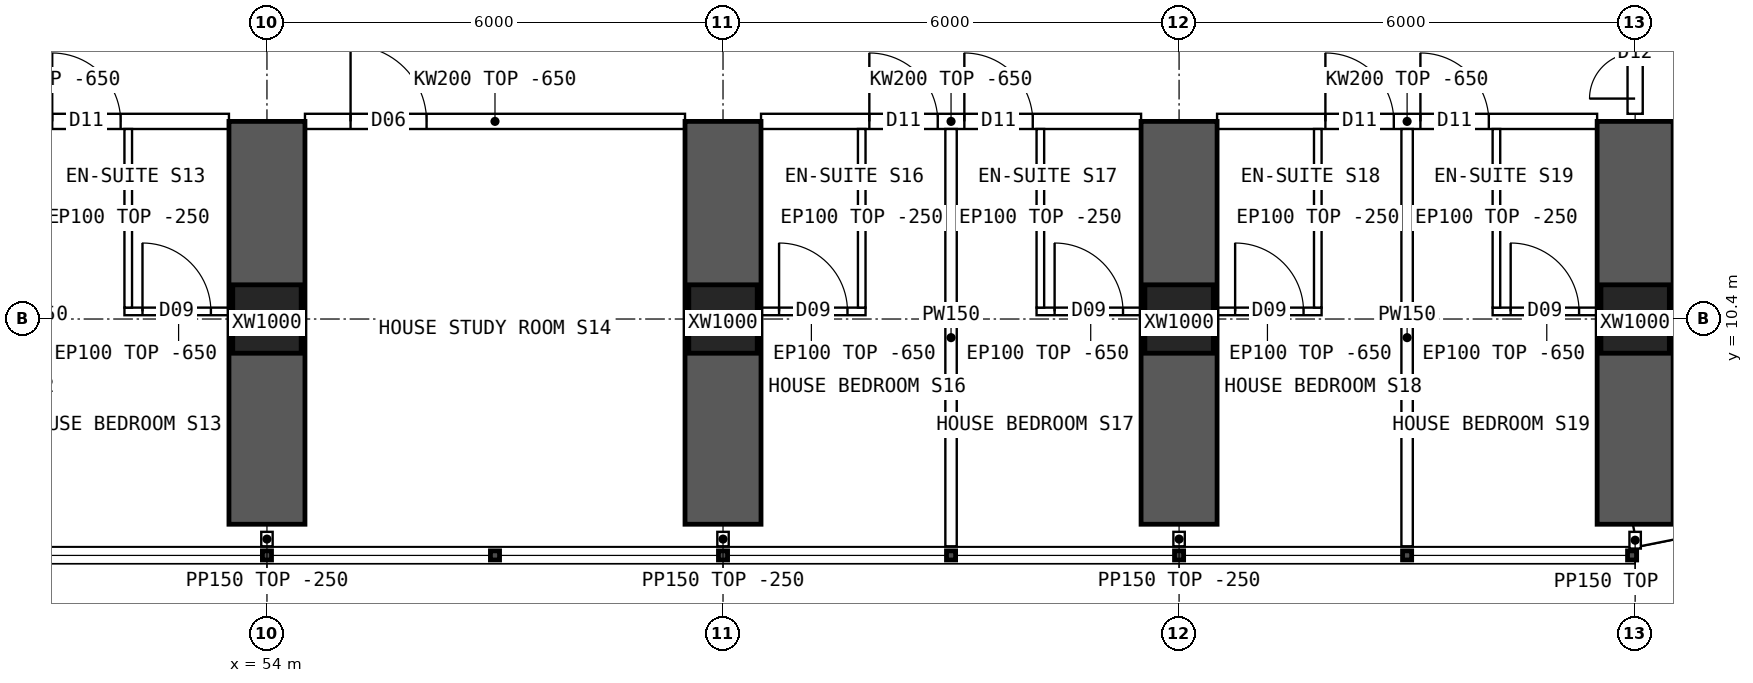
"""IFC4 building model, lengths in metres.
Left out: names, types, materials, properties, quantities, classifications, styles, units other than length and angle.
Written with IfcOpenShell. Run it as: python <this file> out.ifc"""

import sys

from ifc_helpers import new_model, si_unit, direction, frame, frame_2d, origin, origin_2d, place, context, subcontext, project, spatial, polyline, rectangle, hollow_rectangle, outline, extrude, element, fill, save


model = new_model("IFC4")
c1 = context("Model", 3, precision=1e-05, world=origin(), true_north=direction((0.0, 1.0)))
c2 = subcontext(c1, "Body", "Model", "MODEL_VIEW")
j1 = project(units=[si_unit("LENGTHUNIT", "METRE"), si_unit("PLANEANGLEUNIT", "RADIAN")], contexts=[c1])
p1 = place(None, origin())
s1 = spatial("IfcSite", under=j1, at=p1, CompositionType="ELEMENT")
p2 = place(p1, origin())
s2 = spatial("IfcBuilding", under=s1, at=p2, CompositionType="ELEMENT")
p3 = place(p2, frame((0.0, 0.0, 23.95)))
s3 = spatial("IfcBuildingStorey", under=s2, at=p3, CompositionType="ELEMENT", Elevation=23.95)
for number, where, z_axis, x_axis in (
    (1, (54.0, 10.4, 0.0), (0.0, 0.0, 1.0), (1.0, 0.0, 0.0)),
    (2, (60.0, 10.4, 0.0), (0.0, 0.0, 1.0), (1.0, 0.0, 0.0)),
    (3, (66.0, 10.4, 0.0), (0.0, 0.0, 1.0), (1.0, 0.0, 0.0)),
    (4, (72.0, 10.4, 0.0), (0.0, 0.0, 1.0), (1.0, 0.0, 0.0)),
):
    element("IfcColumn", number, at=place(p3, frame(where, z_axis=z_axis, x_axis=x_axis)), inside=s3, PredefinedType="COLUMN", context=c2, shape_type="SweptSolid", body=[
        extrude(hollow_rectangle(XDim=0.9, YDim=0.9, WallThickness=0.09, at=origin_2d()), origin(), (0.0, 0.0, 1.0), 3.75),
    ])
for number, where, z_axis, x_axis in (
    (5, (54.0, 7.7, 0.0), (0.0, 0.0, 1.0), (0.0, 1.0, 0.0)),
    (6, (60.0, 7.7, 0.0), (0.0, 0.0, 1.0), (0.0, 1.0, 0.0)),
    (7, (66.0, 7.7, 0.0), (0.0, 0.0, 1.0), (0.0, 1.0, 0.0)),
    (8, (72.0, 7.7, 0.0), (0.0, 0.0, 1.0), (0.0, 1.0, 0.0)),
):
    element("IfcWall", number, at=place(p3, frame(where, z_axis=z_axis, x_axis=x_axis)), inside=s3, PredefinedType="SHEAR", context=c2, shape_type="SweptSolid", body=[
        extrude(rectangle(XDim=5.3, YDim=1.0, at=frame_2d((2.65, 0.0))), origin(), (0.0, 0.0, 1.0), 3.75),
    ])
p4 = place(p3, frame((72.0, 7.55, 0.0), z_axis=(0.0, 0.0, 1.0), x_axis=(0.980787251524, 0.195080412259, 0.0)))
e9 = element("IfcWall", 9, at=p4, inside=s3, PredefinedType="SOLIDWALL", context=c2, shape_type="SweptSolid", body=[
    extrude(outline(polyline([(-0.03, -0.15), (3.249, -0.15), (3.189, 0.15), (0.03, 0.15), (-0.03, -0.15)])), origin(), (0.0, 0.0, 1.0), 3.5),
])
p5 = place(p4, frame((0.909, 0.0, 0.9)))
e10 = element("IfcOpeningElement", 10, at=p5, cuts=e9, PredefinedType="OPENING", context=c2, shape_type="SweptSolid", body=[
    extrude(rectangle(XDim=1.4, YDim=1.8, at=frame_2d((0.7, 0.9))), frame((0.0, 0.16, 0.0), z_axis=(0.0, -1.0, 0.0), x_axis=(1.0, 0.0, 0.0)), (0.0, 0.0, 1.0), 0.32),
])
p6 = place(p3, frame((48.5, 13.0, 0.0), z_axis=(0.0, 0.0, 1.0), x_axis=(1.0, 0.0, 0.0)))
e11 = element("IfcWall", 11, at=p6, inside=s3, PredefinedType="SOLIDWALL", context=c2, shape_type="SweptSolid", body=[
    extrude(outline(polyline([(0.0, 0.0), (5.0, 0.0), (5.0, 3.1), (0.0, 3.1), (0.0, 0.0)])), frame((0.0, 0.1, 0.0), z_axis=(0.0, -1.0, 0.0), x_axis=(1.0, 0.0, 0.0)), (0.0, 0.0, 1.0), 0.2),
])
p7 = place(p6, frame((1.425, 0.0, 0.0)))
e12 = element("IfcOpeningElement", 12, at=p7, cuts=e11, PredefinedType="OPENING", context=c2, shape_type="SweptSolid", body=[
    extrude(rectangle(XDim=0.9, YDim=2.1, at=frame_2d((0.45, 1.05))), frame((0.0, 0.11, 0.0), z_axis=(0.0, -1.0, 0.0), x_axis=(1.0, 0.0, 0.0)), (0.0, 0.0, 1.0), 0.22),
])
p8 = place(p6, frame((2.675, 0.0, 0.0)))
e13 = element("IfcOpeningElement", 13, at=p8, cuts=e11, PredefinedType="OPENING", context=c2, shape_type="SweptSolid", body=[
    extrude(rectangle(XDim=0.9, YDim=2.1, at=frame_2d((0.45, 1.05))), frame((0.0, 0.11, 0.0), z_axis=(0.0, -1.0, 0.0), x_axis=(1.0, 0.0, 0.0)), (0.0, 0.0, 1.0), 0.22),
])
p9 = place(p3, frame((54.5, 13.0, 0.0), z_axis=(0.0, 0.0, 1.0), x_axis=(1.0, 0.0, 0.0)))
e14 = element("IfcWall", 14, at=p9, inside=s3, PredefinedType="SOLIDWALL", context=c2, shape_type="SweptSolid", body=[
    extrude(outline(polyline([(0.0, 0.0), (5.0, 0.0), (5.0, 3.1), (0.0, 3.1), (0.0, 0.0)])), frame((0.0, 0.1, 0.0), z_axis=(0.0, -1.0, 0.0), x_axis=(1.0, 0.0, 0.0)), (0.0, 0.0, 1.0), 0.2),
])
p10 = place(p9, frame((0.6, 0.0, 0.0)))
e15 = element("IfcOpeningElement", 15, at=p10, cuts=e14, PredefinedType="OPENING", context=c2, shape_type="SweptSolid", body=[
    extrude(rectangle(XDim=1.0, YDim=2.1, at=frame_2d((0.5, 1.05))), frame((0.0, 0.11, 0.0), z_axis=(0.0, -1.0, 0.0), x_axis=(1.0, 0.0, 0.0)), (0.0, 0.0, 1.0), 0.22),
])
p11 = place(p3, frame((60.5, 13.0, 0.0), z_axis=(0.0, 0.0, 1.0), x_axis=(1.0, 0.0, 0.0)))
e16 = element("IfcWall", 16, at=p11, inside=s3, PredefinedType="SOLIDWALL", context=c2, shape_type="SweptSolid", body=[
    extrude(outline(polyline([(0.0, 0.0), (5.0, 0.0), (5.0, 3.1), (0.0, 3.1), (0.0, 0.0)])), frame((0.0, 0.1, 0.0), z_axis=(0.0, -1.0, 0.0), x_axis=(1.0, 0.0, 0.0)), (0.0, 0.0, 1.0), 0.2),
])
p12 = place(p11, frame((1.425, 0.0, 0.0)))
e17 = element("IfcOpeningElement", 17, at=p12, cuts=e16, PredefinedType="OPENING", context=c2, shape_type="SweptSolid", body=[
    extrude(rectangle(XDim=0.9, YDim=2.1, at=frame_2d((0.45, 1.05))), frame((0.0, 0.11, 0.0), z_axis=(0.0, -1.0, 0.0), x_axis=(1.0, 0.0, 0.0)), (0.0, 0.0, 1.0), 0.22),
])
p13 = place(p11, frame((2.675, 0.0, 0.0)))
e18 = element("IfcOpeningElement", 18, at=p13, cuts=e16, PredefinedType="OPENING", context=c2, shape_type="SweptSolid", body=[
    extrude(rectangle(XDim=0.9, YDim=2.1, at=frame_2d((0.45, 1.05))), frame((0.0, 0.11, 0.0), z_axis=(0.0, -1.0, 0.0), x_axis=(1.0, 0.0, 0.0)), (0.0, 0.0, 1.0), 0.22),
])
p14 = place(p3, frame((66.5, 13.0, 0.0), z_axis=(0.0, 0.0, 1.0), x_axis=(1.0, 0.0, 0.0)))
e19 = element("IfcWall", 19, at=p14, inside=s3, PredefinedType="SOLIDWALL", context=c2, shape_type="SweptSolid", body=[
    extrude(outline(polyline([(0.0, 0.0), (5.0, 0.0), (5.0, 3.1), (0.0, 3.1), (0.0, 0.0)])), frame((0.0, 0.1, 0.0), z_axis=(0.0, -1.0, 0.0), x_axis=(1.0, 0.0, 0.0)), (0.0, 0.0, 1.0), 0.2),
])
p15 = place(p14, frame((1.425, 0.0, 0.0)))
e20 = element("IfcOpeningElement", 20, at=p15, cuts=e19, PredefinedType="OPENING", context=c2, shape_type="SweptSolid", body=[
    extrude(rectangle(XDim=0.9, YDim=2.1, at=frame_2d((0.45, 1.05))), frame((0.0, 0.11, 0.0), z_axis=(0.0, -1.0, 0.0), x_axis=(1.0, 0.0, 0.0)), (0.0, 0.0, 1.0), 0.22),
])
p16 = place(p14, frame((2.675, 0.0, 0.0)))
e21 = element("IfcOpeningElement", 21, at=p16, cuts=e19, PredefinedType="OPENING", context=c2, shape_type="SweptSolid", body=[
    extrude(rectangle(XDim=0.9, YDim=2.1, at=frame_2d((0.45, 1.05))), frame((0.0, 0.11, 0.0), z_axis=(0.0, -1.0, 0.0), x_axis=(1.0, 0.0, 0.0)), (0.0, 0.0, 1.0), 0.22),
])
p17 = place(p3, frame((53.55, 10.5, 0.0), z_axis=(0.0, 0.0, 1.0), x_axis=(-1.0, 0.0, 0.0)))
e22 = element("IfcWall", 22, at=p17, inside=s3, PredefinedType="PARTITIONING", context=c2, shape_type="SweptSolid", body=[
    extrude(outline(polyline([(0.0, 0.0), (1.425, 0.0), (1.425, 3.1), (0.0, 3.1), (0.0, 0.0)])), frame((0.0, 0.05, 0.0), z_axis=(0.0, -1.0, 0.0), x_axis=(1.0, 0.0, 0.0)), (0.0, 0.0, 1.0), 0.1),
])
p18 = place(p17, frame((0.288, 0.0, 0.0)))
e23 = element("IfcOpeningElement", 23, at=p18, cuts=e22, PredefinedType="OPENING", context=c2, shape_type="SweptSolid", body=[
    extrude(rectangle(XDim=0.9, YDim=2.1, at=frame_2d((0.45, 1.05))), frame((0.0, 0.06, 0.0), z_axis=(0.0, -1.0, 0.0), x_axis=(1.0, 0.0, 0.0)), (0.0, 0.0, 1.0), 0.12),
])
p19 = place(p3, frame((52.175, 10.55, 0.0), z_axis=(0.0, 0.0, 1.0), x_axis=(0.0, 1.0, 0.0)))
e24 = element("IfcWall", 24, at=p19, inside=s3, PredefinedType="PARTITIONING", context=c2, shape_type="SweptSolid", body=[
    extrude(outline(polyline([(0.0, 0.0), (2.35, 0.0), (2.35, 3.1), (2.302, 3.1), (2.3, 3.5), (0.052, 3.5), (0.05, 3.1), (0.0, 3.1), (0.0, 0.0)])), frame((0.0, 0.05, 0.0), z_axis=(0.0, -1.0, 0.0), x_axis=(1.0, 0.0, 0.0)), (0.0, 0.0, 1.0), 0.1),
])
p20 = place(p3, frame((63.0, 7.41, 0.0), z_axis=(0.0, 0.0, 1.0), x_axis=(0.0, 1.0, 0.0)))
e25 = element("IfcWall", 25, at=p20, inside=s3, PredefinedType="PARTITIONING", context=c2, shape_type="SweptSolid", body=[
    extrude(outline(polyline([(0.0, 0.0), (5.49, 0.0), (5.49, 3.1), (5.442, 3.1), (5.44, 3.5), (3.192, 3.5), (3.19, 3.1), (2.792, 3.1), (2.79, 3.5), (0.0, 3.5), (0.0, 0.0)])), frame((0.0, 0.075, 0.0), z_axis=(0.0, -1.0, 0.0), x_axis=(1.0, 0.0, 0.0)), (0.0, 0.0, 1.0), 0.15),
])
p21 = place(p3, frame((61.875, 10.5, 0.0), z_axis=(0.0, 0.0, 1.0), x_axis=(-1.0, 0.0, 0.0)))
e26 = element("IfcWall", 26, at=p21, inside=s3, PredefinedType="PARTITIONING", context=c2, shape_type="SweptSolid", body=[
    extrude(outline(polyline([(0.0, 0.0), (1.425, 0.0), (1.425, 3.1), (0.0, 3.1), (0.0, 0.0)])), frame((0.0, 0.05, 0.0), z_axis=(0.0, -1.0, 0.0), x_axis=(1.0, 0.0, 0.0)), (0.0, 0.0, 1.0), 0.1),
])
p22 = place(p21, frame((0.238, 0.0, 0.0)))
e27 = element("IfcOpeningElement", 27, at=p22, cuts=e26, PredefinedType="OPENING", context=c2, shape_type="SweptSolid", body=[
    extrude(rectangle(XDim=0.9, YDim=2.1, at=frame_2d((0.45, 1.05))), frame((0.0, 0.06, 0.0), z_axis=(0.0, -1.0, 0.0), x_axis=(1.0, 0.0, 0.0)), (0.0, 0.0, 1.0), 0.12),
])
p23 = place(p3, frame((61.825, 10.55, 0.0), z_axis=(0.0, 0.0, 1.0), x_axis=(0.0, 1.0, 0.0)))
e28 = element("IfcWall", 28, at=p23, inside=s3, PredefinedType="PARTITIONING", context=c2, shape_type="SweptSolid", body=[
    extrude(outline(polyline([(0.0, 0.0), (2.35, 0.0), (2.35, 3.1), (2.302, 3.1), (2.3, 3.5), (0.052, 3.5), (0.05, 3.1), (0.0, 3.1), (0.0, 0.0)])), frame((0.0, 0.05, 0.0), z_axis=(0.0, -1.0, 0.0), x_axis=(1.0, 0.0, 0.0)), (0.0, 0.0, 1.0), 0.1),
])
p24 = place(p3, frame((65.55, 10.5, 0.0), z_axis=(0.0, 0.0, 1.0), x_axis=(-1.0, 0.0, 0.0)))
e29 = element("IfcWall", 29, at=p24, inside=s3, PredefinedType="PARTITIONING", context=c2, shape_type="SweptSolid", body=[
    extrude(outline(polyline([(0.0, 0.0), (1.425, 0.0), (1.425, 3.1), (0.0, 3.1), (0.0, 0.0)])), frame((0.0, 0.05, 0.0), z_axis=(0.0, -1.0, 0.0), x_axis=(1.0, 0.0, 0.0)), (0.0, 0.0, 1.0), 0.1),
])
p25 = place(p24, frame((0.288, 0.0, 0.0)))
e30 = element("IfcOpeningElement", 30, at=p25, cuts=e29, PredefinedType="OPENING", context=c2, shape_type="SweptSolid", body=[
    extrude(rectangle(XDim=0.9, YDim=2.1, at=frame_2d((0.45, 1.05))), frame((0.0, 0.06, 0.0), z_axis=(0.0, -1.0, 0.0), x_axis=(1.0, 0.0, 0.0)), (0.0, 0.0, 1.0), 0.12),
])
p26 = place(p3, frame((64.175, 10.55, 0.0), z_axis=(0.0, 0.0, 1.0), x_axis=(0.0, 1.0, 0.0)))
e31 = element("IfcWall", 31, at=p26, inside=s3, PredefinedType="PARTITIONING", context=c2, shape_type="SweptSolid", body=[
    extrude(outline(polyline([(0.0, 0.0), (2.35, 0.0), (2.35, 3.1), (2.302, 3.1), (2.3, 3.5), (0.052, 3.5), (0.05, 3.1), (0.0, 3.1), (0.0, 0.0)])), frame((0.0, 0.05, 0.0), z_axis=(0.0, -1.0, 0.0), x_axis=(1.0, 0.0, 0.0)), (0.0, 0.0, 1.0), 0.1),
])
p27 = place(p3, frame((69.0, 7.41, 0.0), z_axis=(0.0, 0.0, 1.0), x_axis=(0.0, 1.0, 0.0)))
e32 = element("IfcWall", 32, at=p27, inside=s3, PredefinedType="PARTITIONING", context=c2, shape_type="SweptSolid", body=[
    extrude(outline(polyline([(0.0, 0.0), (5.49, 0.0), (5.49, 3.1), (5.442, 3.1), (5.44, 3.5), (3.192, 3.5), (3.19, 3.1), (2.792, 3.1), (2.79, 3.5), (0.0, 3.5), (0.0, 0.0)])), frame((0.0, 0.075, 0.0), z_axis=(0.0, -1.0, 0.0), x_axis=(1.0, 0.0, 0.0)), (0.0, 0.0, 1.0), 0.15),
])
p28 = place(p3, frame((67.875, 10.5, 0.0), z_axis=(0.0, 0.0, 1.0), x_axis=(-1.0, 0.0, 0.0)))
e33 = element("IfcWall", 33, at=p28, inside=s3, PredefinedType="PARTITIONING", context=c2, shape_type="SweptSolid", body=[
    extrude(outline(polyline([(0.0, 0.0), (1.425, 0.0), (1.425, 3.1), (0.0, 3.1), (0.0, 0.0)])), frame((0.0, 0.05, 0.0), z_axis=(0.0, -1.0, 0.0), x_axis=(1.0, 0.0, 0.0)), (0.0, 0.0, 1.0), 0.1),
])
p29 = place(p28, frame((0.238, 0.0, 0.0)))
e34 = element("IfcOpeningElement", 34, at=p29, cuts=e33, PredefinedType="OPENING", context=c2, shape_type="SweptSolid", body=[
    extrude(rectangle(XDim=0.9, YDim=2.1, at=frame_2d((0.45, 1.05))), frame((0.0, 0.06, 0.0), z_axis=(0.0, -1.0, 0.0), x_axis=(1.0, 0.0, 0.0)), (0.0, 0.0, 1.0), 0.12),
])
p30 = place(p3, frame((67.825, 10.55, 0.0), z_axis=(0.0, 0.0, 1.0), x_axis=(0.0, 1.0, 0.0)))
e35 = element("IfcWall", 35, at=p30, inside=s3, PredefinedType="PARTITIONING", context=c2, shape_type="SweptSolid", body=[
    extrude(outline(polyline([(0.0, 0.0), (2.35, 0.0), (2.35, 3.1), (2.302, 3.1), (2.3, 3.5), (0.052, 3.5), (0.05, 3.1), (0.0, 3.1), (0.0, 0.0)])), frame((0.0, 0.05, 0.0), z_axis=(0.0, -1.0, 0.0), x_axis=(1.0, 0.0, 0.0)), (0.0, 0.0, 1.0), 0.1),
])
p31 = place(p3, frame((71.55, 10.5, 0.0), z_axis=(0.0, 0.0, 1.0), x_axis=(-1.0, 0.0, 0.0)))
e36 = element("IfcWall", 36, at=p31, inside=s3, PredefinedType="PARTITIONING", context=c2, shape_type="SweptSolid", body=[
    extrude(outline(polyline([(0.0, 0.0), (1.425, 0.0), (1.425, 3.1), (0.0, 3.1), (0.0, 0.0)])), frame((0.0, 0.05, 0.0), z_axis=(0.0, -1.0, 0.0), x_axis=(1.0, 0.0, 0.0)), (0.0, 0.0, 1.0), 0.1),
])
p32 = place(p31, frame((0.288, 0.0, 0.0)))
e37 = element("IfcOpeningElement", 37, at=p32, cuts=e36, PredefinedType="OPENING", context=c2, shape_type="SweptSolid", body=[
    extrude(rectangle(XDim=0.9, YDim=2.1, at=frame_2d((0.45, 1.05))), frame((0.0, 0.06, 0.0), z_axis=(0.0, -1.0, 0.0), x_axis=(1.0, 0.0, 0.0)), (0.0, 0.0, 1.0), 0.12),
])
p33 = place(p3, frame((70.175, 10.55, 0.0), z_axis=(0.0, 0.0, 1.0), x_axis=(0.0, 1.0, 0.0)))
e38 = element("IfcWall", 38, at=p33, inside=s3, PredefinedType="PARTITIONING", context=c2, shape_type="SweptSolid", body=[
    extrude(outline(polyline([(0.0, 0.0), (2.35, 0.0), (2.35, 3.1), (2.302, 3.1), (2.3, 3.5), (0.052, 3.5), (0.05, 3.1), (0.0, 3.1), (0.0, 0.0)])), frame((0.0, 0.05, 0.0), z_axis=(0.0, -1.0, 0.0), x_axis=(1.0, 0.0, 0.0)), (0.0, 0.0, 1.0), 0.1),
])
p34 = place(p3, frame((72.0, 13.1, 0.0), z_axis=(0.0, 0.0, 1.0), x_axis=(0.0, 1.0, 0.0)))
e39 = element("IfcWall", 39, at=p34, inside=s3, PredefinedType="SOLIDWALL", context=c2, shape_type="SweptSolid", body=[
    extrude(outline(polyline([(0.0, 0.0), (1.6, 0.0), (1.6, 3.05), (0.0, 3.05), (0.0, 0.0)])), frame((0.0, 0.1, 0.0), z_axis=(0.0, -1.0, 0.0), x_axis=(1.0, 0.0, 0.0)), (0.0, 0.0, 1.0), 0.2),
])
p35 = place(p34, frame((0.2, 0.0, 0.0)))
e40 = element("IfcOpeningElement", 40, at=p35, cuts=e39, PredefinedType="OPENING", context=c2, shape_type="SweptSolid", body=[
    extrude(rectangle(XDim=1.2, YDim=2.1, at=frame_2d((0.6, 1.05))), frame((0.0, 0.11, 0.0), z_axis=(0.0, -1.0, 0.0), x_axis=(1.0, 0.0, 0.0)), (0.0, 0.0, 1.0), 0.22),
])
for number, where, z_axis, x_axis in (
    (41, (54.0, 7.6, 0.0), (0.0, 0.0, 1.0), (0.0, -1.0, 0.0)),
    (42, (60.0, 7.6, 0.0), (0.0, 0.0, 1.0), (0.0, -1.0, 0.0)),
    (43, (66.0, 7.6, 0.0), (0.0, 0.0, 1.0), (0.0, -1.0, 0.0)),
):
    element("IfcWall", number, at=place(p3, frame(where, z_axis=z_axis, x_axis=x_axis)), inside=s3, PredefinedType="PARTITIONING", context=c2, shape_type="SweptSolid", body=[
        extrude(rectangle(XDim=0.19, YDim=0.15, at=frame_2d((0.095, 0.0))), origin(), (0.0, 0.0, 1.0), 3.5),
    ])
p36 = place(p3, frame((72.0, 7.6, 0.0), z_axis=(0.0, 0.0, 1.0), x_axis=(0.0, -1.0, 0.0)))
e44 = element("IfcWall", 44, at=p36, inside=s3, PredefinedType="PARTITIONING", context=c2, shape_type="SweptSolid", body=[
    extrude(rectangle(XDim=0.22, YDim=0.15, at=frame_2d((0.11, 0.0))), origin(), (0.0, 0.0, 1.0), 3.5),
])
p37 = place(p18, origin())
e45 = element("IfcDoor", 45, at=p37, inside=s3, OperationType="SINGLE_SWING_RIGHT", PredefinedType="DOOR", context=c2, shape_type="SweptSolid", body=[
    extrude(rectangle(XDim=0.9, YDim=2.1, at=frame_2d((0.45, 1.05))), frame((0.0, 0.025, 0.0), z_axis=(0.0, -1.0, 0.0), x_axis=(1.0, 0.0, 0.0)), (0.0, 0.0, 1.0), 0.05),
])
fill(e23, e45)
p38 = place(p8, origin())
e46 = element("IfcDoor", 46, at=p38, inside=s3, OperationType="SINGLE_SWING_LEFT", PredefinedType="DOOR", context=c2, shape_type="SweptSolid", body=[
    extrude(rectangle(XDim=0.9, YDim=2.1, at=frame_2d((0.45, 1.05))), frame((0.0, 0.025, 0.0), z_axis=(0.0, -1.0, 0.0), x_axis=(1.0, 0.0, 0.0)), (0.0, 0.0, 1.0), 0.05),
])
fill(e13, e46)
p39 = place(p10, origin())
e47 = element("IfcDoor", 47, at=p39, inside=s3, OperationType="SINGLE_SWING_LEFT", PredefinedType="DOOR", context=c2, shape_type="SweptSolid", body=[
    extrude(rectangle(XDim=1.0, YDim=2.1, at=frame_2d((0.5, 1.05))), frame((0.0, 0.025, 0.0), z_axis=(0.0, -1.0, 0.0), x_axis=(1.0, 0.0, 0.0)), (0.0, 0.0, 1.0), 0.05),
])
fill(e15, e47)
p40 = place(p22, origin())
e48 = element("IfcDoor", 48, at=p40, inside=s3, OperationType="SINGLE_SWING_RIGHT", PredefinedType="DOOR", context=c2, shape_type="SweptSolid", body=[
    extrude(rectangle(XDim=0.9, YDim=2.1, at=frame_2d((0.45, 1.05))), frame((0.0, 0.025, 0.0), z_axis=(0.0, -1.0, 0.0), x_axis=(1.0, 0.0, 0.0)), (0.0, 0.0, 1.0), 0.05),
])
fill(e27, e48)
p41 = place(p12, origin())
e49 = element("IfcDoor", 49, at=p41, inside=s3, OperationType="SINGLE_SWING_LEFT", PredefinedType="DOOR", context=c2, shape_type="SweptSolid", body=[
    extrude(rectangle(XDim=0.9, YDim=2.1, at=frame_2d((0.45, 1.05))), frame((0.0, 0.025, 0.0), z_axis=(0.0, -1.0, 0.0), x_axis=(1.0, 0.0, 0.0)), (0.0, 0.0, 1.0), 0.05),
])
fill(e17, e49)
p42 = place(p25, origin())
e50 = element("IfcDoor", 50, at=p42, inside=s3, OperationType="SINGLE_SWING_RIGHT", PredefinedType="DOOR", context=c2, shape_type="SweptSolid", body=[
    extrude(rectangle(XDim=0.9, YDim=2.1, at=frame_2d((0.45, 1.05))), frame((0.0, 0.025, 0.0), z_axis=(0.0, -1.0, 0.0), x_axis=(1.0, 0.0, 0.0)), (0.0, 0.0, 1.0), 0.05),
])
fill(e30, e50)
p43 = place(p13, origin())
e51 = element("IfcDoor", 51, at=p43, inside=s3, OperationType="SINGLE_SWING_LEFT", PredefinedType="DOOR", context=c2, shape_type="SweptSolid", body=[
    extrude(rectangle(XDim=0.9, YDim=2.1, at=frame_2d((0.45, 1.05))), frame((0.0, 0.025, 0.0), z_axis=(0.0, -1.0, 0.0), x_axis=(1.0, 0.0, 0.0)), (0.0, 0.0, 1.0), 0.05),
])
fill(e18, e51)
p44 = place(p29, origin())
e52 = element("IfcDoor", 52, at=p44, inside=s3, OperationType="SINGLE_SWING_RIGHT", PredefinedType="DOOR", context=c2, shape_type="SweptSolid", body=[
    extrude(rectangle(XDim=0.9, YDim=2.1, at=frame_2d((0.45, 1.05))), frame((0.0, 0.025, 0.0), z_axis=(0.0, -1.0, 0.0), x_axis=(1.0, 0.0, 0.0)), (0.0, 0.0, 1.0), 0.05),
])
fill(e34, e52)
p45 = place(p15, origin())
e53 = element("IfcDoor", 53, at=p45, inside=s3, OperationType="SINGLE_SWING_LEFT", PredefinedType="DOOR", context=c2, shape_type="SweptSolid", body=[
    extrude(rectangle(XDim=0.9, YDim=2.1, at=frame_2d((0.45, 1.05))), frame((0.0, 0.025, 0.0), z_axis=(0.0, -1.0, 0.0), x_axis=(1.0, 0.0, 0.0)), (0.0, 0.0, 1.0), 0.05),
])
fill(e20, e53)
p46 = place(p32, origin())
e54 = element("IfcDoor", 54, at=p46, inside=s3, OperationType="SINGLE_SWING_RIGHT", PredefinedType="DOOR", context=c2, shape_type="SweptSolid", body=[
    extrude(rectangle(XDim=0.9, YDim=2.1, at=frame_2d((0.45, 1.05))), frame((0.0, 0.025, 0.0), z_axis=(0.0, -1.0, 0.0), x_axis=(1.0, 0.0, 0.0)), (0.0, 0.0, 1.0), 0.05),
])
fill(e37, e54)
p47 = place(p16, origin())
e55 = element("IfcDoor", 55, at=p47, inside=s3, OperationType="SINGLE_SWING_LEFT", PredefinedType="DOOR", context=c2, shape_type="SweptSolid", body=[
    extrude(rectangle(XDim=0.9, YDim=2.1, at=frame_2d((0.45, 1.05))), frame((0.0, 0.025, 0.0), z_axis=(0.0, -1.0, 0.0), x_axis=(1.0, 0.0, 0.0)), (0.0, 0.0, 1.0), 0.05),
])
fill(e21, e55)
p48 = place(p35, origin())
e56 = element("IfcDoor", 56, at=p48, inside=s3, OperationType="DOUBLE_DOOR_SINGLE_SWING", PredefinedType="DOOR", context=c2, shape_type="SweptSolid", body=[
    extrude(rectangle(XDim=1.2, YDim=2.1, at=frame_2d((0.6, 1.05))), frame((0.0, 0.025, 0.0), z_axis=(0.0, -1.0, 0.0), x_axis=(1.0, 0.0, 0.0)), (0.0, 0.0, 1.0), 0.05),
])
fill(e40, e56)
save(model, sys.argv[1])
